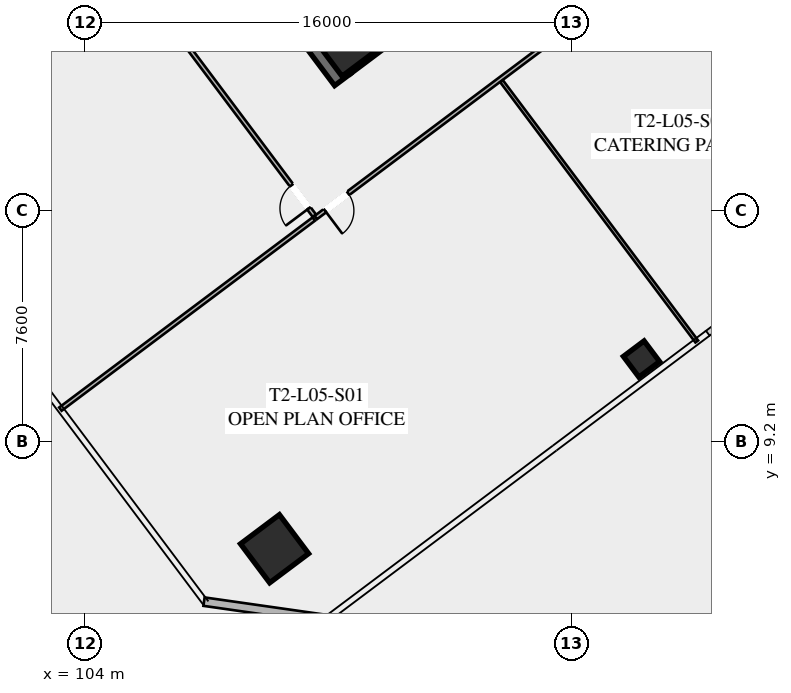
"""IFC4 building model, lengths in metres.
Left out: names, types, materials, properties, quantities, classifications, styles, units other than length and angle.
Written with IfcOpenShell. Run it as: python <this file> out.ifc"""

import sys

from ifc_helpers import new_model, si_unit, direction, frame, frame_2d, origin, origin_2d, place, context, subcontext, project, spatial, rectangle, hollow_rectangle, extrude, element, fill, save


model = new_model("IFC4")
c1 = context("Model", 3, precision=1e-05, world=origin(), true_north=direction((0.0, 1.0)))
c2 = subcontext(c1, "Body", "Model", "MODEL_VIEW")
j1 = project(units=[si_unit("LENGTHUNIT", "METRE"), si_unit("PLANEANGLEUNIT", "RADIAN")], contexts=[c1])
p1 = place(None, origin())
s1 = spatial("IfcSite", under=j1, at=p1, CompositionType="ELEMENT")
p2 = place(p1, origin())
s2 = spatial("IfcBuilding", under=s1, at=p2, CompositionType="ELEMENT")
p3 = place(p2, frame((0.0, 0.0, 24.6)))
s3 = spatial("IfcBuildingStorey", under=s2, at=p3, CompositionType="ELEMENT", Elevation=24.6)
p4 = place(p3, frame((112.476, 21.107, 0.0), z_axis=(0.0, 0.0, 1.0), x_axis=(-0.600005007985, 0.799996243986, 0.0)))
e1 = element("IfcWall", 1, at=p4, inside=s3, PredefinedType="SHEAR", context=c2, shape_type="SweptSolid", body=[
    extrude(rectangle(XDim=15.6, YDim=0.65, at=frame_2d((7.8, 0.0))), origin(), (0.0, 0.0, 1.0), 3.55),
])
p5 = place(p3, frame((124.429, 30.478, 0.0), z_axis=(0.0, 0.0, 1.0), x_axis=(-0.799998028465, -0.600002628705, 0.0)))
e2 = element("IfcWall", 2, at=p5, inside=s3, PredefinedType="SHEAR", context=c2, shape_type="SweptSolid", body=[
    extrude(rectangle(XDim=14.86, YDim=0.65, at=frame_2d((7.43, 0.0))), origin(), (0.0, 0.0, 1.0), 3.55),
])
p6 = place(p5, frame((9.13, 0.0, 0.0)))
e3 = element("IfcOpeningElement", 3, at=p6, cuts=e2, PredefinedType="OPENING", context=c2, shape_type="SweptSolid", body=[
    extrude(rectangle(XDim=1.25, YDim=2.25, at=frame_2d((0.625, 1.125))), frame((0.0, 0.335, 0.0), z_axis=(0.0, -1.0, 0.0), x_axis=(1.0, 0.0, 0.0)), (0.0, 0.0, 1.0), 0.67),
])
p7 = place(p5, frame((4.08, 0.0, 0.0)))
e4 = element("IfcOpeningElement", 4, at=p7, cuts=e2, PredefinedType="OPENING", context=c2, shape_type="SweptSolid", body=[
    extrude(rectangle(XDim=1.25, YDim=2.25, at=frame_2d((0.625, 1.125))), frame((0.0, 0.335, 0.0), z_axis=(0.0, -1.0, 0.0), x_axis=(1.0, 0.0, 0.0)), (0.0, 0.0, 1.0), 0.67),
])
p8 = place(p3, frame((112.59, 22.13, 0.0), z_axis=(0.0, 0.0, 1.0), x_axis=(0.799999996291, 0.600000004945, 0.0)))
e5 = element("IfcColumn", 5, at=p8, inside=s3, PredefinedType="COLUMN", context=c2, shape_type="SweptSolid", body=[
    extrude(hollow_rectangle(XDim=1.3, YDim=1.3, WallThickness=0.05, at=origin_2d()), origin(), (0.0, 0.0, 1.0), 3.35),
])
p9 = place(p3, frame((110.24, 5.68, 0.0), z_axis=(0.0, 0.0, 1.0), x_axis=(0.799999996291, 0.600000004945, 0.0)))
e6 = element("IfcColumn", 6, at=p9, inside=s3, PredefinedType="COLUMN", context=c2, shape_type="SweptSolid", body=[
    extrude(hollow_rectangle(XDim=1.6, YDim=1.6, WallThickness=0.06, at=origin_2d()), origin(), (0.0, 0.0, 1.0), 3.35),
])
p10 = place(p3, frame((122.31, 11.92, 0.0), z_axis=(0.0, 0.0, 1.0), x_axis=(0.799999996291, 0.600000004945, 0.0)))
e7 = element("IfcColumn", 7, at=p10, inside=s3, PredefinedType="COLUMN", context=c2, shape_type="SweptSolid", body=[
    extrude(hollow_rectangle(XDim=0.85, YDim=0.85, WallThickness=0.035, at=origin_2d()), origin(), (0.0, 0.0, 1.0), 3.35),
])
p11 = place(p3, frame((111.98, 3.36, 0.0), z_axis=(0.0, 0.0, 1.0), x_axis=(-0.989955445613, 0.14137968631, 0.0)))
e8 = element("IfcWall", 8, at=p11, inside=s3, PredefinedType="SOLIDWALL", context=c2, shape_type="SweptSolid", body=[
    extrude(rectangle(XDim=4.101, YDim=0.28, at=frame_2d((2.051, 0.0))), origin(), (0.0, 0.0, 1.0), 3.35),
])
p12 = place(p3, frame((135.46, 34.47, 0.0), z_axis=(0.0, 0.0, 1.0), x_axis=(-0.800000982127, -0.599998690494, 0.0)))
e9 = element("IfcWall", 9, at=p12, inside=s3, PredefinedType="PARTITIONING", context=c2, shape_type="SweptSolid", body=[
    extrude(rectangle(XDim=29.83, YDim=0.135, at=frame_2d((14.915, 0.0))), origin(), (0.0, 0.0, 1.0), 2.703),
])
p13 = place(p12, frame((28.5, 0.0, 0.0)))
e10 = element("IfcOpeningElement", 10, at=p13, cuts=e9, PredefinedType="OPENING", context=c2, shape_type="SweptSolid", body=[
    extrude(rectangle(XDim=0.95, YDim=2.05, at=frame_2d((0.475, 1.025))), frame((0.0, 0.077, 0.0), z_axis=(0.0, -1.0, 0.0), x_axis=(1.0, 0.0, 0.0)), (0.0, 0.0, 1.0), 0.155),
])
p14 = place(p12, frame((18.075, 0.0, 0.0)))
e11 = element("IfcOpeningElement", 11, at=p14, cuts=e9, PredefinedType="OPENING", context=c2, shape_type="SweptSolid", body=[
    extrude(rectangle(XDim=0.95, YDim=2.05, at=frame_2d((0.475, 1.025))), frame((0.0, 0.077, 0.0), z_axis=(0.0, -1.0, 0.0), x_axis=(1.0, 0.0, 0.0)), (0.0, 0.0, 1.0), 0.155),
])
p15 = place(p12, frame((0.38, 0.0, 0.0)))
e12 = element("IfcOpeningElement", 12, at=p15, cuts=e9, PredefinedType="OPENING", context=c2, shape_type="SweptSolid", body=[
    extrude(rectangle(XDim=0.95, YDim=2.05, at=frame_2d((0.475, 1.025))), frame((0.0, 0.077, 0.0), z_axis=(0.0, -1.0, 0.0), x_axis=(1.0, 0.0, 0.0)), (0.0, 0.0, 1.0), 0.155),
])
p16 = place(p3, frame((124.128, 12.496, 0.0), z_axis=(0.0, 0.0, 1.0), x_axis=(-0.600003650761, 0.799997261916, 0.0)))
e13 = element("IfcWall", 13, at=p16, inside=s3, PredefinedType="PARTITIONING", context=c2, shape_type="SweptSolid", body=[
    extrude(rectangle(XDim=10.7, YDim=0.11, at=frame_2d((5.35, 0.0))), origin(), (0.0, 0.0, 1.0), 2.703),
])
p17 = place(p3, frame((130.048, 16.936, 0.0), z_axis=(0.0, 0.0, 1.0), x_axis=(-0.600007301277, 0.79999452399, 0.0)))
e14 = element("IfcWall", 14, at=p17, inside=s3, PredefinedType="PARTITIONING", context=c2, shape_type="SweptSolid", body=[
    extrude(rectangle(XDim=10.7, YDim=0.11, at=frame_2d((5.35, 0.0))), origin(), (0.0, 0.0, 1.0), 2.703),
])
p18 = place(p3, frame((111.548, 16.636, 0.0), z_axis=(0.0, 0.0, 1.0), x_axis=(-0.600003610192, 0.799997292343, 0.0)))
e15 = element("IfcWall", 15, at=p18, inside=s3, PredefinedType="PARTITIONING", context=c2, shape_type="SweptSolid", body=[
    extrude(rectangle(XDim=21.64, YDim=0.135, at=frame_2d((10.82, 0.0))), origin(), (0.0, 0.0, 1.0), 2.703),
])
p19 = place(p18, frame((0.3, 0.0, 0.0)))
e16 = element("IfcOpeningElement", 16, at=p19, cuts=e15, PredefinedType="OPENING", context=c2, shape_type="SweptSolid", body=[
    extrude(rectangle(XDim=0.95, YDim=2.05, at=frame_2d((0.475, 1.025))), frame((0.0, 0.077, 0.0), z_axis=(0.0, -1.0, 0.0), x_axis=(1.0, 0.0, 0.0)), (0.0, 0.0, 1.0), 0.155),
])
p20 = place(p3, frame((103.196, 10.272, 0.0), z_axis=(0.0, 0.0, 1.0), x_axis=(0.8, 0.6, 0.0)))
e17 = element("IfcWall", 17, at=p20, inside=s3, PredefinedType="PARTITIONING", context=c2, shape_type="SweptSolid", body=[
    extrude(rectangle(XDim=10.42, YDim=0.135, at=frame_2d((5.21, 0.0))), origin(), (0.0, 0.0, 1.0), 2.703),
])
p21 = place(p13, origin())
e18 = element("IfcDoor", 18, at=p21, inside=s3, OperationType="SINGLE_SWING_RIGHT", PredefinedType="DOOR", context=c2, shape_type="SweptSolid", body=[
    extrude(rectangle(XDim=0.95, YDim=2.05, at=frame_2d((0.475, 1.025))), frame((0.0, 0.025, 0.0), z_axis=(0.0, -1.0, 0.0), x_axis=(1.0, 0.0, 0.0)), (0.0, 0.0, 1.0), 0.05),
])
fill(e10, e18)
p22 = place(p19, origin())
e19 = element("IfcDoor", 19, at=p22, inside=s3, OperationType="SINGLE_SWING_LEFT", PredefinedType="DOOR", context=c2, shape_type="SweptSolid", body=[
    extrude(rectangle(XDim=0.95, YDim=2.05, at=frame_2d((0.475, 1.025))), frame((0.0, 0.025, 0.0), z_axis=(0.0, -1.0, 0.0), x_axis=(1.0, 0.0, 0.0)), (0.0, 0.0, 1.0), 0.05),
])
fill(e16, e19)
save(model, sys.argv[1])
